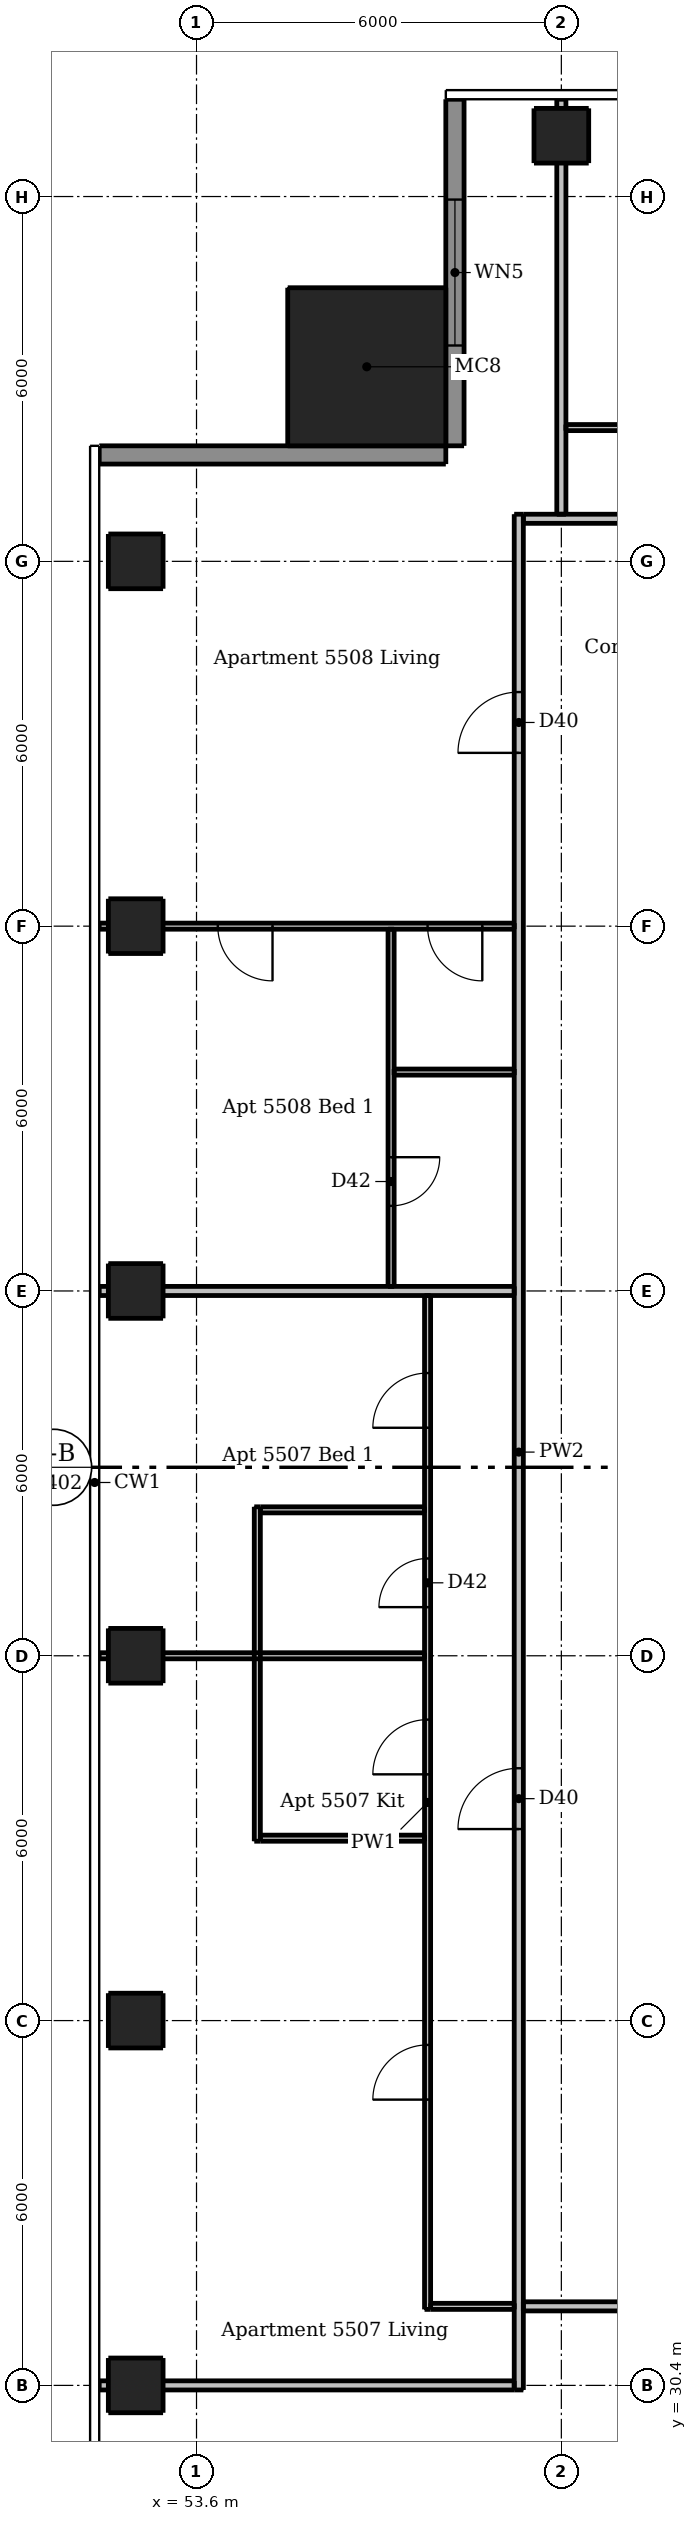
"""IFC4 building model, lengths in metres.
Left out: names, types, materials, properties, quantities, classifications, styles, units other than length and angle.
Written with IfcOpenShell. Run it as: python <this file> out.ifc"""

import sys

from ifc_helpers import new_model, si_unit, direction, frame, frame_2d, origin, origin_2d, place, context, subcontext, project, spatial, rectangle, extrude, element, fill, save


model = new_model("IFC4")
c1 = context("Model", 3, precision=1e-05, world=origin(), true_north=direction((0.0, 1.0)))
c2 = subcontext(c1, "Body", "Model", "MODEL_VIEW")
j1 = project(units=[si_unit("LENGTHUNIT", "METRE"), si_unit("PLANEANGLEUNIT", "RADIAN")], contexts=[c1])
p1 = place(None, origin())
s1 = spatial("IfcSite", under=j1, at=p1, CompositionType="ELEMENT")
p2 = place(p1, origin())
s2 = spatial("IfcBuilding", under=s1, at=p2, CompositionType="ELEMENT")
p3 = place(p2, frame((0.0, 0.0, 206.8)))
s3 = spatial("IfcBuildingStorey", under=s2, at=p3, CompositionType="ELEMENT", Elevation=206.8)
for number, where, z_axis, x_axis in (
    (1, (59.6, 67.4, 0.0), (0.0, 0.0, 1.0), (1.0, 0.0, 0.0)),
    (2, (52.6, 30.4, 0.0), (0.0, 0.0, 1.0), (1.0, 0.0, 0.0)),
    (3, (52.6, 36.4, 0.0), (0.0, 0.0, 1.0), (1.0, 0.0, 0.0)),
    (4, (52.6, 42.4, 0.0), (0.0, 0.0, 1.0), (1.0, 0.0, 0.0)),
    (5, (52.6, 48.4, 0.0), (0.0, 0.0, 1.0), (1.0, 0.0, 0.0)),
    (6, (52.6, 54.4, 0.0), (0.0, 0.0, 1.0), (1.0, 0.0, 0.0)),
    (7, (52.6, 60.4, 0.0), (0.0, 0.0, 1.0), (1.0, 0.0, 0.0)),
):
    element("IfcColumn", number, at=place(p3, frame(where, z_axis=z_axis, x_axis=x_axis)), inside=s3, PredefinedType="COLUMN", context=c2, shape_type="SweptSolid", body=[
        extrude(rectangle(XDim=0.9, YDim=0.9, at=origin_2d()), origin(), (0.0, 0.0, 1.0), 3.05),
    ])
p4 = place(p3, frame((56.4, 63.6, 0.0), z_axis=(0.0, 0.0, 1.0), x_axis=(1.0, 0.0, 0.0)))
e8 = element("IfcColumn", 8, at=p4, inside=s3, PredefinedType="COLUMN", context=c2, shape_type="SweptSolid", body=[
    extrude(rectangle(XDim=2.6, YDim=2.6, at=origin_2d()), origin(), (0.0, 0.0, 1.0), 3.3),
])
p5 = place(p3, frame((57.85, 68.0, 0.0), z_axis=(0.0, 0.0, 1.0), x_axis=(0.0, -1.0, 0.0)))
e9 = element("IfcWall", 9, at=p5, inside=s3, PredefinedType="SOLIDWALL", context=c2, shape_type="SweptSolid", body=[
    extrude(rectangle(XDim=5.7, YDim=0.3, at=frame_2d((2.85, 0.0))), origin(), (0.0, 0.0, 1.0), 3.05),
])
p6 = place(p5, frame((1.65, 0.0, 0.15)))
e10 = element("IfcOpeningElement", 10, at=p6, cuts=e9, PredefinedType="OPENING", context=c2, shape_type="SweptSolid", body=[
    extrude(rectangle(XDim=2.4, YDim=2.1, at=frame_2d((1.2, 1.05))), frame((0.0, 0.16, 0.0), z_axis=(0.0, -1.0, 0.0), x_axis=(1.0, 0.0, 0.0)), (0.0, 0.0, 1.0), 0.32),
])
p7 = place(p3, frame((57.7, 62.15, 0.0), z_axis=(0.0, 0.0, 1.0), x_axis=(-1.0, 0.0, 0.0)))
e11 = element("IfcWall", 11, at=p7, inside=s3, PredefinedType="SOLIDWALL", context=c2, shape_type="SweptSolid", body=[
    extrude(rectangle(XDim=5.7, YDim=0.3, at=frame_2d((2.85, 0.0))), origin(), (0.0, 0.0, 1.0), 3.05),
])
p8 = place(p3, frame((54.6, 39.35, 0.0), z_axis=(0.0, 0.0, 1.0), x_axis=(0.0, 1.0, 0.0)))
e12 = element("IfcWall", 12, at=p8, inside=s3, PredefinedType="PARTITIONING", context=c2, shape_type="SweptSolid", body=[
    extrude(rectangle(XDim=5.5, YDim=0.1, at=frame_2d((2.75, 0.0))), origin(), (0.0, 0.0, 1.0), 3.05),
])
p9 = place(p3, frame((56.8, 54.35, 0.0), z_axis=(0.0, 0.0, 1.0), x_axis=(0.0, -1.0, 0.0)))
e13 = element("IfcWall", 13, at=p9, inside=s3, PredefinedType="PARTITIONING", context=c2, shape_type="SweptSolid", body=[
    extrude(rectangle(XDim=5.875, YDim=0.1, at=frame_2d((2.938, 0.0))), origin(), (0.0, 0.0, 1.0), 3.05),
])
p10 = place(p9, frame((3.75, 0.0, 0.0)))
e14 = element("IfcOpeningElement", 14, at=p10, cuts=e13, PredefinedType="OPENING", context=c2, shape_type="SweptSolid", body=[
    extrude(rectangle(XDim=0.8, YDim=2.1, at=frame_2d((0.4, 1.05))), frame((0.0, 0.06, 0.0), z_axis=(0.0, -1.0, 0.0), x_axis=(1.0, 0.0, 0.0)), (0.0, 0.0, 1.0), 0.12),
])
p11 = place(p3, frame((57.4, 31.65, 0.0), z_axis=(0.0, 0.0, 1.0), x_axis=(0.0, 1.0, 0.0)))
e15 = element("IfcWall", 15, at=p11, inside=s3, PredefinedType="PARTITIONING", context=c2, shape_type="SweptSolid", body=[
    extrude(rectangle(XDim=16.675, YDim=0.1, at=frame_2d((8.337, 0.0))), origin(), (0.0, 0.0, 1.0), 3.05),
])
p12 = place(p11, frame((3.45, 0.0, 0.0)))
e16 = element("IfcOpeningElement", 16, at=p12, cuts=e15, PredefinedType="OPENING", context=c2, shape_type="SweptSolid", body=[
    extrude(rectangle(XDim=0.9, YDim=2.1, at=frame_2d((0.45, 1.05))), frame((0.0, 0.06, 0.0), z_axis=(0.0, -1.0, 0.0), x_axis=(1.0, 0.0, 0.0)), (0.0, 0.0, 1.0), 0.12),
])
p13 = place(p11, frame((8.8, 0.0, 0.0)))
e17 = element("IfcOpeningElement", 17, at=p13, cuts=e15, PredefinedType="OPENING", context=c2, shape_type="SweptSolid", body=[
    extrude(rectangle(XDim=0.9, YDim=2.1, at=frame_2d((0.45, 1.05))), frame((0.0, 0.06, 0.0), z_axis=(0.0, -1.0, 0.0), x_axis=(1.0, 0.0, 0.0)), (0.0, 0.0, 1.0), 0.12),
])
p14 = place(p11, frame((14.5, 0.0, 0.0)))
e18 = element("IfcOpeningElement", 18, at=p14, cuts=e15, PredefinedType="OPENING", context=c2, shape_type="SweptSolid", body=[
    extrude(rectangle(XDim=0.9, YDim=2.1, at=frame_2d((0.45, 1.05))), frame((0.0, 0.06, 0.0), z_axis=(0.0, -1.0, 0.0), x_axis=(1.0, 0.0, 0.0)), (0.0, 0.0, 1.0), 0.12),
])
p15 = place(p11, frame((11.55, 0.0, 0.0)))
e19 = element("IfcOpeningElement", 19, at=p15, cuts=e15, PredefinedType="OPENING", context=c2, shape_type="SweptSolid", body=[
    extrude(rectangle(XDim=0.8, YDim=2.1, at=frame_2d((0.4, 1.05))), frame((0.0, 0.06, 0.0), z_axis=(0.0, -1.0, 0.0), x_axis=(1.0, 0.0, 0.0)), (0.0, 0.0, 1.0), 0.12),
])
p16 = place(p3, frame((59.675, 62.6, 0.0), z_axis=(0.0, 0.0, 1.0), x_axis=(1.0, 0.0, 0.0)))
e20 = element("IfcWall", 20, at=p16, inside=s3, PredefinedType="PARTITIONING", context=c2, shape_type="SweptSolid", body=[
    extrude(rectangle(XDim=17.85, YDim=0.1, at=frame_2d((8.925, 0.0))), origin(), (0.0, 0.0, 1.0), 3.05),
])
p17 = place(p16, frame((3.975, 0.0, 0.0)))
e21 = element("IfcOpeningElement", 21, at=p17, cuts=e20, PredefinedType="OPENING", context=c2, shape_type="SweptSolid", body=[
    extrude(rectangle(XDim=0.9, YDim=2.1, at=frame_2d((0.45, 1.05))), frame((0.0, 0.06, 0.0), z_axis=(0.0, -1.0, 0.0), x_axis=(1.0, 0.0, 0.0)), (0.0, 0.0, 1.0), 0.12),
])
p18 = place(p16, frame((9.975, 0.0, 0.0)))
e22 = element("IfcOpeningElement", 22, at=p18, cuts=e20, PredefinedType="OPENING", context=c2, shape_type="SweptSolid", body=[
    extrude(rectangle(XDim=0.9, YDim=2.1, at=frame_2d((0.45, 1.05))), frame((0.0, 0.06, 0.0), z_axis=(0.0, -1.0, 0.0), x_axis=(1.0, 0.0, 0.0)), (0.0, 0.0, 1.0), 0.12),
])
p19 = place(p16, frame((15.675, 0.0, 0.0)))
e23 = element("IfcOpeningElement", 23, at=p19, cuts=e20, PredefinedType="OPENING", context=c2, shape_type="SweptSolid", body=[
    extrude(rectangle(XDim=0.9, YDim=2.1, at=frame_2d((0.45, 1.05))), frame((0.0, 0.06, 0.0), z_axis=(0.0, -1.0, 0.0), x_axis=(1.0, 0.0, 0.0)), (0.0, 0.0, 1.0), 0.12),
])
p20 = place(p16, frame((12.725, 0.0, 0.0)))
e24 = element("IfcOpeningElement", 24, at=p20, cuts=e20, PredefinedType="OPENING", context=c2, shape_type="SweptSolid", body=[
    extrude(rectangle(XDim=0.8, YDim=2.1, at=frame_2d((0.4, 1.05))), frame((0.0, 0.06, 0.0), z_axis=(0.0, -1.0, 0.0), x_axis=(1.0, 0.0, 0.0)), (0.0, 0.0, 1.0), 0.12),
])
p21 = place(p3, frame((58.825, 54.4, 0.0), z_axis=(0.0, 0.0, 1.0), x_axis=(-1.0, 0.0, 0.0)))
e25 = element("IfcWall", 25, at=p21, inside=s3, PredefinedType="PARTITIONING", context=c2, shape_type="SweptSolid", body=[
    extrude(rectangle(XDim=6.825, YDim=0.1, at=frame_2d((3.413, 0.0))), origin(), (0.0, 0.0, 1.0), 2.516),
])
p22 = place(p21, frame((0.525, 0.0, 0.0)))
e26 = element("IfcOpeningElement", 26, at=p22, cuts=e25, PredefinedType="OPENING", context=c2, shape_type="SweptSolid", body=[
    extrude(rectangle(XDim=0.9, YDim=2.1, at=frame_2d((0.45, 1.05))), frame((0.0, 0.06, 0.0), z_axis=(0.0, -1.0, 0.0), x_axis=(1.0, 0.0, 0.0)), (0.0, 0.0, 1.0), 0.12),
])
p23 = place(p21, frame((3.975, 0.0, 0.0)))
e27 = element("IfcOpeningElement", 27, at=p23, cuts=e25, PredefinedType="OPENING", context=c2, shape_type="SweptSolid", body=[
    extrude(rectangle(XDim=0.9, YDim=2.1, at=frame_2d((0.45, 1.05))), frame((0.0, 0.06, 0.0), z_axis=(0.0, -1.0, 0.0), x_axis=(1.0, 0.0, 0.0)), (0.0, 0.0, 1.0), 0.12),
])
p24 = place(p3, frame((56.85, 52.0, 0.0), z_axis=(0.0, 0.0, 1.0), x_axis=(1.0, 0.0, 0.0)))
e28 = element("IfcWall", 28, at=p24, inside=s3, PredefinedType="PARTITIONING", context=c2, shape_type="SweptSolid", body=[
    extrude(rectangle(XDim=1.975, YDim=0.1, at=frame_2d((0.987, 0.0))), origin(), (0.0, 0.0, 1.0), 3.05),
])
p25 = place(p3, frame((54.65, 44.8, 0.0), z_axis=(0.0, 0.0, 1.0), x_axis=(1.0, 0.0, 0.0)))
e29 = element("IfcWall", 29, at=p25, inside=s3, PredefinedType="PARTITIONING", context=c2, shape_type="SweptSolid", body=[
    extrude(rectangle(XDim=2.7, YDim=0.1, at=frame_2d((1.35, 0.0))), origin(), (0.0, 0.0, 1.0), 3.05),
])
p26 = place(p3, frame((52.0, 42.4, 0.0), z_axis=(0.0, 0.0, 1.0), x_axis=(1.0, 0.0, 0.0)))
e30 = element("IfcWall", 30, at=p26, inside=s3, PredefinedType="PARTITIONING", context=c2, shape_type="SweptSolid", body=[
    extrude(rectangle(XDim=5.35, YDim=0.1, at=frame_2d((2.675, 0.0))), origin(), (0.0, 0.0, 1.0), 2.516),
])
p27 = place(p3, frame((54.65, 39.4, 0.0), z_axis=(0.0, 0.0, 1.0), x_axis=(1.0, 0.0, 0.0)))
e31 = element("IfcWall", 31, at=p27, inside=s3, PredefinedType="PARTITIONING", context=c2, shape_type="SweptSolid", body=[
    extrude(rectangle(XDim=2.7, YDim=0.1, at=frame_2d((1.35, 0.0))), origin(), (0.0, 0.0, 1.0), 3.05),
])
p28 = place(p3, frame((57.45, 31.7, 0.0), z_axis=(0.0, 0.0, 1.0), x_axis=(1.0, 0.0, 0.0)))
e32 = element("IfcWall", 32, at=p28, inside=s3, PredefinedType="PARTITIONING", context=c2, shape_type="SweptSolid", body=[
    extrude(rectangle(XDim=1.375, YDim=0.1, at=frame_2d((0.688, 0.0))), origin(), (0.0, 0.0, 1.0), 3.05),
])
p29 = place(p3, frame((58.9, 30.325, 0.0), z_axis=(0.0, 0.0, 1.0), x_axis=(0.0, 1.0, 0.0)))
e33 = element("IfcWall", 33, at=p29, inside=s3, PredefinedType="PARTITIONING", context=c2, shape_type="SweptSolid", body=[
    extrude(rectangle(XDim=30.85, YDim=0.15, at=frame_2d((15.425, 0.0))), origin(), (0.0, 0.0, 1.0), 3.05),
])
p30 = place(p29, frame((9.225, 0.0, 0.0)))
e34 = element("IfcOpeningElement", 34, at=p30, cuts=e33, PredefinedType="OPENING", context=c2, shape_type="SweptSolid", body=[
    extrude(rectangle(XDim=1.0, YDim=2.1, at=frame_2d((0.5, 1.05))), frame((0.0, 0.085, 0.0), z_axis=(0.0, -1.0, 0.0), x_axis=(1.0, 0.0, 0.0)), (0.0, 0.0, 1.0), 0.17),
])
p31 = place(p29, frame((26.925, 0.0, 0.0)))
e35 = element("IfcOpeningElement", 35, at=p31, cuts=e33, PredefinedType="OPENING", context=c2, shape_type="SweptSolid", body=[
    extrude(rectangle(XDim=1.0, YDim=2.1, at=frame_2d((0.5, 1.05))), frame((0.0, 0.085, 0.0), z_axis=(0.0, -1.0, 0.0), x_axis=(1.0, 0.0, 0.0)), (0.0, 0.0, 1.0), 0.17),
])
p32 = place(p3, frame((59.6, 61.175, 0.0), z_axis=(0.0, 0.0, 1.0), x_axis=(0.0, 1.0, 0.0)))
e36 = element("IfcWall", 36, at=p32, inside=s3, PredefinedType="PARTITIONING", context=c2, shape_type="SweptSolid", body=[
    extrude(rectangle(XDim=6.825, YDim=0.15, at=frame_2d((3.413, 0.0))), origin(), (0.0, 0.0, 1.0), 2.51),
])
p33 = place(p3, frame((58.975, 61.1, 0.0), z_axis=(0.0, 0.0, 1.0), x_axis=(1.0, 0.0, 0.0)))
e37 = element("IfcWall", 37, at=p33, inside=s3, PredefinedType="PARTITIONING", context=c2, shape_type="SweptSolid", body=[
    extrude(rectangle(XDim=29.25, YDim=0.15, at=frame_2d((14.625, 0.0))), origin(), (0.0, 0.0, 1.0), 3.05),
])
p34 = place(p33, frame((9.125, 0.0, 0.0)))
e38 = element("IfcOpeningElement", 38, at=p34, cuts=e37, PredefinedType="OPENING", context=c2, shape_type="SweptSolid", body=[
    extrude(rectangle(XDim=1.0, YDim=2.1, at=frame_2d((0.5, 1.05))), frame((0.0, 0.085, 0.0), z_axis=(0.0, -1.0, 0.0), x_axis=(1.0, 0.0, 0.0)), (0.0, 0.0, 1.0), 0.17),
])
p35 = place(p33, frame((26.475, 0.0, 0.0)))
e39 = element("IfcOpeningElement", 39, at=p35, cuts=e37, PredefinedType="OPENING", context=c2, shape_type="SweptSolid", body=[
    extrude(rectangle(XDim=1.0, YDim=2.1, at=frame_2d((0.5, 1.05))), frame((0.0, 0.085, 0.0), z_axis=(0.0, -1.0, 0.0), x_axis=(1.0, 0.0, 0.0)), (0.0, 0.0, 1.0), 0.17),
])
p36 = place(p3, frame((52.0, 48.4, 0.0), z_axis=(0.0, 0.0, 1.0), x_axis=(1.0, 0.0, 0.0)))
e40 = element("IfcWall", 40, at=p36, inside=s3, PredefinedType="PARTITIONING", context=c2, shape_type="SweptSolid", body=[
    extrude(rectangle(XDim=6.825, YDim=0.15, at=frame_2d((3.413, 0.0))), origin(), (0.0, 0.0, 1.0), 2.516),
])
p37 = place(p3, frame((89.525, 31.7, 0.0), z_axis=(0.0, 0.0, 1.0), x_axis=(-1.0, 0.0, 0.0)))
e41 = element("IfcWall", 41, at=p37, inside=s3, PredefinedType="PARTITIONING", context=c2, shape_type="SweptSolid", body=[
    extrude(rectangle(XDim=30.55, YDim=0.15, at=frame_2d((15.275, 0.0))), origin(), (0.0, 0.0, 1.0), 3.05),
])
p38 = place(p37, frame((26.775, 0.0, 0.0)))
e42 = element("IfcOpeningElement", 42, at=p38, cuts=e41, PredefinedType="OPENING", context=c2, shape_type="SweptSolid", body=[
    extrude(rectangle(XDim=1.0, YDim=2.1, at=frame_2d((0.5, 1.05))), frame((0.0, 0.085, 0.0), z_axis=(0.0, -1.0, 0.0), x_axis=(1.0, 0.0, 0.0)), (0.0, 0.0, 1.0), 0.17),
])
p39 = place(p37, frame((9.075, 0.0, 0.0)))
e43 = element("IfcOpeningElement", 43, at=p39, cuts=e41, PredefinedType="OPENING", context=c2, shape_type="SweptSolid", body=[
    extrude(rectangle(XDim=1.0, YDim=2.1, at=frame_2d((0.5, 1.05))), frame((0.0, 0.085, 0.0), z_axis=(0.0, -1.0, 0.0), x_axis=(1.0, 0.0, 0.0)), (0.0, 0.0, 1.0), 0.17),
])
p40 = place(p3, frame((52.0, 30.4, 0.0), z_axis=(0.0, 0.0, 1.0), x_axis=(1.0, 0.0, 0.0)))
e44 = element("IfcWall", 44, at=p40, inside=s3, PredefinedType="PARTITIONING", context=c2, shape_type="SweptSolid", body=[
    extrude(rectangle(XDim=6.825, YDim=0.15, at=frame_2d((3.413, 0.0))), origin(), (0.0, 0.0, 1.0), 2.647),
])
p41 = place(p6, origin())
e45 = element("IfcWindow", 45, at=p41, inside=s3, PartitioningType="DOUBLE_PANEL_VERTICAL", PredefinedType="WINDOW", context=c2, shape_type="SweptSolid", body=[
    extrude(rectangle(XDim=2.4, YDim=2.1, at=frame_2d((1.2, 1.05))), frame((0.0, 0.03, 0.0), z_axis=(0.0, -1.0, 0.0), x_axis=(1.0, 0.0, 0.0)), (0.0, 0.0, 1.0), 0.06),
])
fill(e10, e45)
p42 = place(p30, origin())
e46 = element("IfcDoor", 46, at=p42, inside=s3, OperationType="SINGLE_SWING_LEFT", PredefinedType="DOOR", context=c2, shape_type="SweptSolid", body=[
    extrude(rectangle(XDim=1.0, YDim=2.1, at=frame_2d((0.5, 1.05))), frame((0.0, 0.025, 0.0), z_axis=(0.0, -1.0, 0.0), x_axis=(1.0, 0.0, 0.0)), (0.0, 0.0, 1.0), 0.05),
])
fill(e34, e46)
p43 = place(p12, origin())
e47 = element("IfcDoor", 47, at=p43, inside=s3, OperationType="SINGLE_SWING_LEFT", PredefinedType="DOOR", context=c2, shape_type="SweptSolid", body=[
    extrude(rectangle(XDim=0.9, YDim=2.1, at=frame_2d((0.45, 1.05))), frame((0.0, 0.025, 0.0), z_axis=(0.0, -1.0, 0.0), x_axis=(1.0, 0.0, 0.0)), (0.0, 0.0, 1.0), 0.05),
])
fill(e16, e47)
p44 = place(p13, origin())
e48 = element("IfcDoor", 48, at=p44, inside=s3, OperationType="SINGLE_SWING_LEFT", PredefinedType="DOOR", context=c2, shape_type="SweptSolid", body=[
    extrude(rectangle(XDim=0.9, YDim=2.1, at=frame_2d((0.45, 1.05))), frame((0.0, 0.025, 0.0), z_axis=(0.0, -1.0, 0.0), x_axis=(1.0, 0.0, 0.0)), (0.0, 0.0, 1.0), 0.05),
])
fill(e17, e48)
p45 = place(p14, origin())
e49 = element("IfcDoor", 49, at=p45, inside=s3, OperationType="SINGLE_SWING_LEFT", PredefinedType="DOOR", context=c2, shape_type="SweptSolid", body=[
    extrude(rectangle(XDim=0.9, YDim=2.1, at=frame_2d((0.45, 1.05))), frame((0.0, 0.025, 0.0), z_axis=(0.0, -1.0, 0.0), x_axis=(1.0, 0.0, 0.0)), (0.0, 0.0, 1.0), 0.05),
])
fill(e18, e49)
p46 = place(p15, origin())
e50 = element("IfcDoor", 50, at=p46, inside=s3, OperationType="SINGLE_SWING_LEFT", PredefinedType="DOOR", context=c2, shape_type="SweptSolid", body=[
    extrude(rectangle(XDim=0.8, YDim=2.1, at=frame_2d((0.4, 1.05))), frame((0.0, 0.025, 0.0), z_axis=(0.0, -1.0, 0.0), x_axis=(1.0, 0.0, 0.0)), (0.0, 0.0, 1.0), 0.05),
])
fill(e19, e50)
p47 = place(p31, origin())
e51 = element("IfcDoor", 51, at=p47, inside=s3, OperationType="SINGLE_SWING_LEFT", PredefinedType="DOOR", context=c2, shape_type="SweptSolid", body=[
    extrude(rectangle(XDim=1.0, YDim=2.1, at=frame_2d((0.5, 1.05))), frame((0.0, 0.025, 0.0), z_axis=(0.0, -1.0, 0.0), x_axis=(1.0, 0.0, 0.0)), (0.0, 0.0, 1.0), 0.05),
])
fill(e35, e51)
p48 = place(p22, origin())
e52 = element("IfcDoor", 52, at=p48, inside=s3, OperationType="SINGLE_SWING_LEFT", PredefinedType="DOOR", context=c2, shape_type="SweptSolid", body=[
    extrude(rectangle(XDim=0.9, YDim=2.1, at=frame_2d((0.45, 1.05))), frame((0.0, 0.025, 0.0), z_axis=(0.0, -1.0, 0.0), x_axis=(1.0, 0.0, 0.0)), (0.0, 0.0, 1.0), 0.05),
])
fill(e26, e52)
p49 = place(p23, origin())
e53 = element("IfcDoor", 53, at=p49, inside=s3, OperationType="SINGLE_SWING_LEFT", PredefinedType="DOOR", context=c2, shape_type="SweptSolid", body=[
    extrude(rectangle(XDim=0.9, YDim=2.1, at=frame_2d((0.45, 1.05))), frame((0.0, 0.025, 0.0), z_axis=(0.0, -1.0, 0.0), x_axis=(1.0, 0.0, 0.0)), (0.0, 0.0, 1.0), 0.05),
])
fill(e27, e53)
p50 = place(p10, origin())
e54 = element("IfcDoor", 54, at=p50, inside=s3, OperationType="SINGLE_SWING_LEFT", PredefinedType="DOOR", context=c2, shape_type="SweptSolid", body=[
    extrude(rectangle(XDim=0.8, YDim=2.1, at=frame_2d((0.4, 1.05))), frame((0.0, 0.025, 0.0), z_axis=(0.0, -1.0, 0.0), x_axis=(1.0, 0.0, 0.0)), (0.0, 0.0, 1.0), 0.05),
])
fill(e14, e54)
save(model, sys.argv[1])
